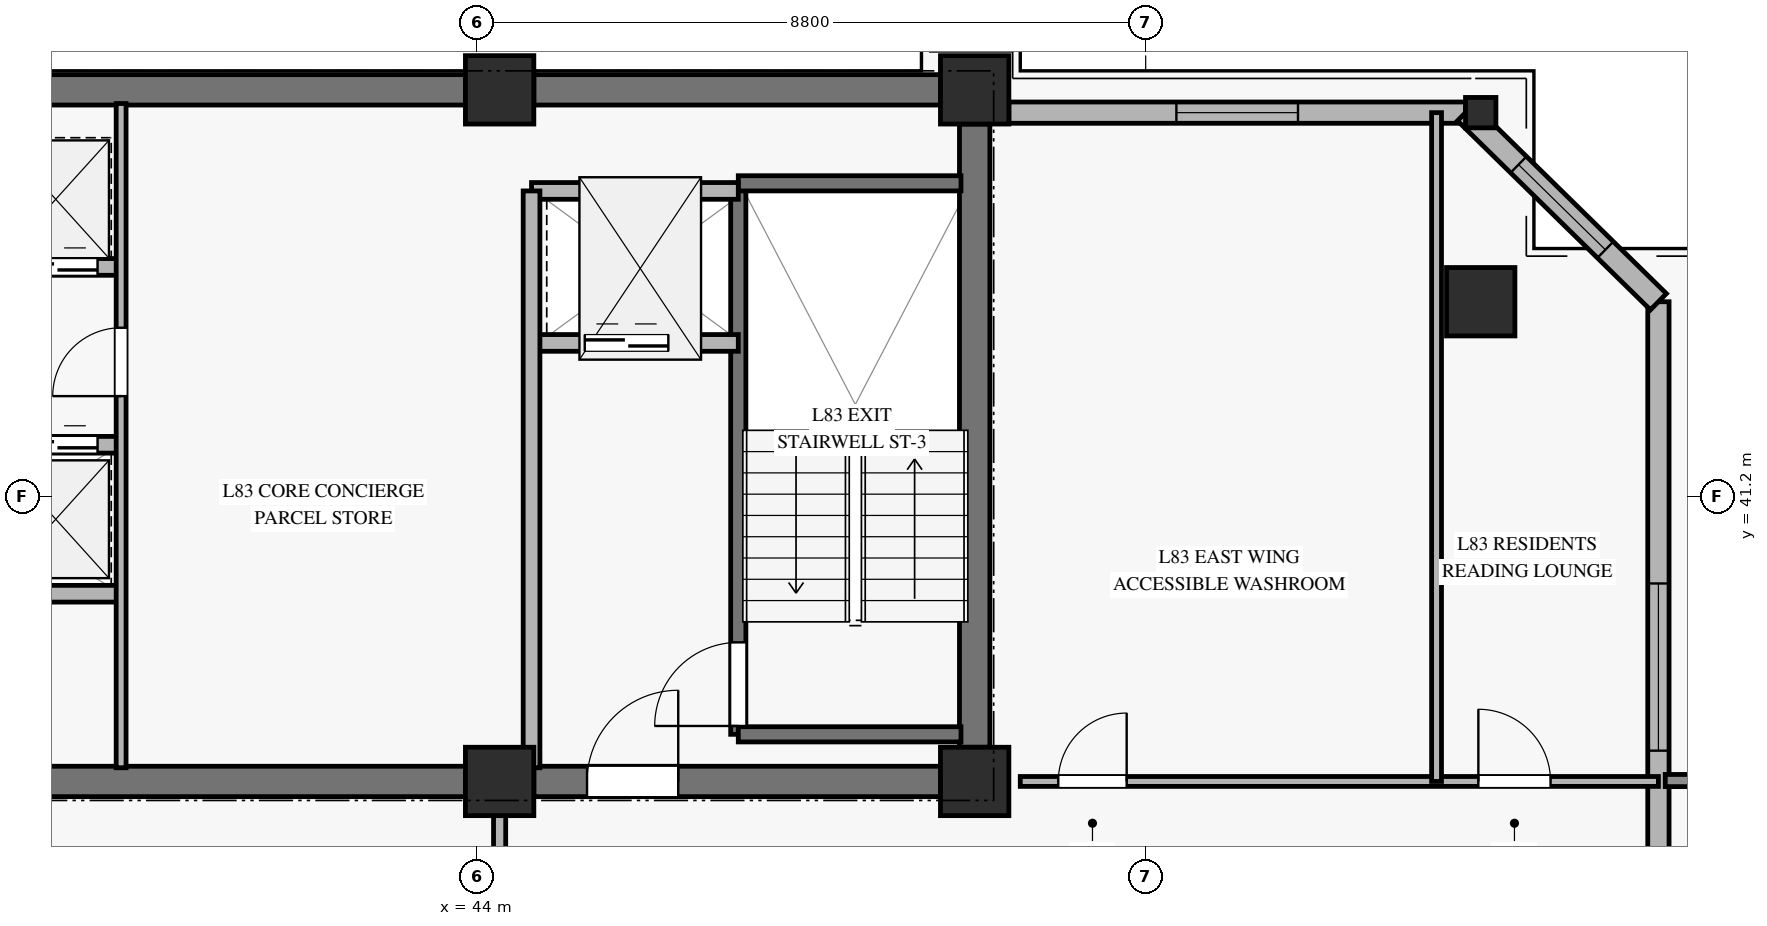
"""IFC4 building model, lengths in metres.
Left out: names, types, materials, properties, quantities, classifications, styles, units other than length and angle.
Written with IfcOpenShell. Run it as: python <this file> out.ifc"""

import sys

from ifc_helpers import new_model, si_unit, direction, frame, frame_2d, origin, origin_2d, place, context, subcontext, project, spatial, rectangle, hollow_rectangle, extrude, source, transform, mapped, element, fill, save


model = new_model("IFC4")
c1 = context("Model", 3, precision=1e-05, world=origin(), true_north=direction((0.0, 1.0)))
c2 = subcontext(c1, "Body", "Model", "MODEL_VIEW")
j1 = project(units=[si_unit("LENGTHUNIT", "METRE"), si_unit("PLANEANGLEUNIT", "RADIAN")], contexts=[c1])
p1 = place(None, origin())
s1 = spatial("IfcSite", under=j1, at=p1, CompositionType="ELEMENT")
p2 = place(p1, origin())
s2 = spatial("IfcBuilding", under=s1, at=p2, CompositionType="ELEMENT")
p3 = place(p2, frame((0.0, 0.0, 321.0)))
s3 = spatial("IfcBuildingStorey", under=s2, at=p3, CompositionType="ELEMENT", Elevation=321.0)
m1 = source(origin(), c2, "Body", "SweptSolid", [
    extrude(rectangle(XDim=0.9, YDim=0.9, at=origin_2d()), origin(), (0.0, 0.0, 1.0), 3.185),
])
for number, where, z_axis, x_axis in (
    (1, (44.3, 37.45, 0.0), (0.0, 0.0, 1.0), (1.0, 0.0, 0.0)),
    (2, (44.3, 46.55, 0.0), (0.0, 0.0, 1.0), (1.0, 0.0, 0.0)),
    (3, (50.55, 37.45, 0.0), (0.0, 0.0, 1.0), (1.0, 0.0, 0.0)),
    (4, (50.55, 46.55, 0.0), (0.0, 0.0, 1.0), (1.0, 0.0, 0.0)),
):
    element("IfcColumn", number, at=place(p3, frame(where, z_axis=z_axis, x_axis=x_axis)), inside=s3, PredefinedType="PILASTER", context=c2, shape_type="MappedRepresentation", body=[
        mapped(m1, transform((0.0, 0.0, 0.0), x_axis=(1.0, 0.0, 0.0), y_axis=(0.0, 1.0, 0.0), z_axis=(0.0, 0.0, 1.0), scale=1.0)),
    ])
p4 = place(p3, frame((36.05, 46.55, 0.0), z_axis=(0.0, 0.0, 1.0), x_axis=(1.0, 0.0, 0.0)))
e5 = element("IfcWall", 5, at=p4, inside=s3, PredefinedType="SHEAR", context=c2, shape_type="SweptSolid", body=[
    extrude(rectangle(XDim=7.8, YDim=0.4, at=frame_2d((3.9, 0.0))), origin(), (0.0, 0.0, 1.0), 3.185),
])
p5 = place(p3, frame((44.75, 46.55, 0.0), z_axis=(0.0, 0.0, 1.0), x_axis=(1.0, 0.0, 0.0)))
e6 = element("IfcWall", 6, at=p5, inside=s3, PredefinedType="SHEAR", context=c2, shape_type="SweptSolid", body=[
    extrude(rectangle(XDim=5.35, YDim=0.4, at=frame_2d((2.675, 0.0))), origin(), (0.0, 0.0, 1.0), 3.185),
])
p6 = place(p3, frame((36.05, 37.45, 0.0), z_axis=(0.0, 0.0, 1.0), x_axis=(1.0, 0.0, 0.0)))
e7 = element("IfcWall", 7, at=p6, inside=s3, PredefinedType="SHEAR", context=c2, shape_type="SweptSolid", body=[
    extrude(rectangle(XDim=7.8, YDim=0.4, at=frame_2d((3.9, 0.0))), origin(), (0.0, 0.0, 1.0), 3.185),
])
p7 = place(p3, frame((44.75, 37.45, 0.0), z_axis=(0.0, 0.0, 1.0), x_axis=(1.0, 0.0, 0.0)))
e8 = element("IfcWall", 8, at=p7, inside=s3, PredefinedType="SHEAR", context=c2, shape_type="SweptSolid", body=[
    extrude(rectangle(XDim=5.35, YDim=0.4, at=frame_2d((2.675, 0.0))), origin(), (0.0, 0.0, 1.0), 3.185),
])
p8 = place(p7, frame((0.7, 0.0, 0.0)))
e9 = element("IfcOpeningElement", 9, at=p8, cuts=e8, PredefinedType="OPENING", context=c2, shape_type="SweptSolid", body=[
    extrude(rectangle(XDim=1.2, YDim=2.15, at=frame_2d((0.6, 1.075))), frame((0.0, 0.21, 0.0), z_axis=(0.0, -1.0, 0.0), x_axis=(1.0, 0.0, 0.0)), (0.0, 0.0, 1.0), 0.42),
])
p9 = place(p3, frame((50.55, 37.9, 0.0), z_axis=(0.0, 0.0, 1.0), x_axis=(0.0, 1.0, 0.0)))
e10 = element("IfcWall", 10, at=p9, inside=s3, PredefinedType="SHEAR", context=c2, shape_type="SweptSolid", body=[
    extrude(rectangle(XDim=8.2, YDim=0.4, at=frame_2d((4.1, 0.0))), origin(), (0.0, 0.0, 1.0), 3.185),
])
m2 = source(origin(), c2, "Body", "SweptSolid", [
    extrude(hollow_rectangle(XDim=0.9, YDim=0.9, WallThickness=0.04, at=origin_2d()), origin(), (0.0, 0.0, 1.0), 3.207),
])
p10 = place(p3, frame((57.208, 43.762, 0.0), z_axis=(-0.115039919341, 0.014389506787, 0.993256643095), x_axis=(-0.12411555831, -0.992267770405, 0.0)))
e11 = element("IfcColumn", 11, at=p10, inside=s3, PredefinedType="COLUMN", context=c2, shape_type="MappedRepresentation", body=[
    mapped(m2, transform((0.0, 0.0, 0.0), x_axis=(1.0, 0.0, 0.0), y_axis=(0.0, 1.0, 0.0), z_axis=(0.0, 0.0, 1.0), scale=1.0)),
])
m3 = source(origin(), c2, "Body", "SweptSolid", [
    extrude(hollow_rectangle(XDim=0.4, YDim=0.4, WallThickness=0.02, at=origin_2d()), origin(), (0.0, 0.0, 1.0), 3.206),
])
p11 = place(p3, frame((57.208, 46.25, 0.0), z_axis=(-0.115051831153, 0.0, 0.993359489887), x_axis=(0.0, -1.0, 0.0)))
e12 = element("IfcColumn", 12, at=p11, inside=s3, PredefinedType="COLUMN", context=c2, shape_type="MappedRepresentation", body=[
    mapped(m3, transform((0.0, 0.0, 0.0), x_axis=(1.0, 0.0, 0.0), y_axis=(0.0, 1.0, 0.0), z_axis=(0.0, 0.0, 1.0), scale=1.0)),
])
p12 = place(p3, frame((59.546, 33.602, 0.0), z_axis=(0.0, 0.0, 1.0), x_axis=(0.0, 1.0, 0.0)))
e13 = element("IfcWall", 13, at=p12, inside=s3, PredefinedType="SOLIDWALL", context=c2, shape_type="SweptSolid", body=[
    extrude(rectangle(XDim=10.16, YDim=0.28, at=frame_2d((5.08, 0.0))), origin(), (0.0, 0.0, 1.0), 2.815),
])
p13 = place(p12, frame((4.253, 0.0, 0.45)))
e14 = element("IfcOpeningElement", 14, at=p13, cuts=e13, PredefinedType="OPENING", context=c2, shape_type="SweptSolid", body=[
    extrude(rectangle(XDim=2.2, YDim=2.1, at=frame_2d((1.1, 1.05))), frame((0.0, 0.15, 0.0), z_axis=(0.0, -1.0, 0.0), x_axis=(1.0, 0.0, 0.0)), (0.0, 0.0, 1.0), 0.3),
])
p14 = place(p3, frame((51.0, 46.25, 0.0), z_axis=(0.0, 0.0, 1.0), x_axis=(1.0, 0.0, 0.0)))
e15 = element("IfcWall", 15, at=p14, inside=s3, PredefinedType="SOLIDWALL", context=c2, shape_type="SweptSolid", body=[
    extrude(rectangle(XDim=6.008, YDim=0.28, at=frame_2d((3.004, 0.0))), origin(), (0.0, 0.0, 1.0), 2.815),
])
p15 = place(p14, frame((2.204, 0.0, 0.45)))
e16 = element("IfcOpeningElement", 16, at=p15, cuts=e15, PredefinedType="OPENING", context=c2, shape_type="SweptSolid", body=[
    extrude(rectangle(XDim=1.6, YDim=2.0, at=frame_2d((0.8, 1.0))), frame((0.0, 0.15, 0.0), z_axis=(0.0, -1.0, 0.0), x_axis=(1.0, 0.0, 0.0)), (0.0, 0.0, 1.0), 0.3),
])
p16 = place(p3, frame((59.546, 43.762, 0.0), z_axis=(0.0, 0.0, 1.0), x_axis=(-0.714078899205, 0.700065229611, 0.0)))
e17 = element("IfcWall", 17, at=p16, inside=s3, PredefinedType="SOLIDWALL", context=c2, shape_type="SweptSolid", body=[
    extrude(rectangle(XDim=3.554, YDim=0.3, at=frame_2d((1.777, 0.0))), origin(), (0.0, 0.0, 1.0), 2.815),
])
p17 = place(p16, frame((0.977, 0.0, 0.45)))
e18 = element("IfcOpeningElement", 18, at=p17, cuts=e17, PredefinedType="OPENING", context=c2, shape_type="SweptSolid", body=[
    extrude(rectangle(XDim=1.6, YDim=2.0, at=frame_2d((0.8, 1.0))), frame((0.0, 0.16, 0.0), z_axis=(0.0, -1.0, 0.0), x_axis=(1.0, 0.0, 0.0)), (0.0, 0.0, 1.0), 0.32),
])
p18 = place(p3, frame((47.44, 38.07, 0.0), z_axis=(0.0, 0.0, 1.0), x_axis=(0.0, 1.0, 0.0)))
e19 = element("IfcWall", 19, at=p18, inside=s3, PredefinedType="SOLIDWALL", context=c2, shape_type="SweptSolid", body=[
    extrude(rectangle(XDim=7.25, YDim=0.2, at=frame_2d((3.625, 0.0))), origin(), (0.0, 0.0, 1.0), 3.4),
])
p19 = place(p18, frame((0.11, 0.0, 0.0)))
e20 = element("IfcOpeningElement", 20, at=p19, cuts=e19, PredefinedType="OPENING", context=c2, shape_type="SweptSolid", body=[
    extrude(rectangle(XDim=1.1, YDim=2.15, at=frame_2d((0.55, 1.075))), frame((0.0, 0.11, 0.0), z_axis=(0.0, -1.0, 0.0), x_axis=(1.0, 0.0, 0.0)), (0.0, 0.0, 1.0), 0.22),
])
for number, where, z_axis, x_axis in (
    (21, (47.44, 45.32, 0.0), (0.0, 0.0, 1.0), (1.0, 0.0, 0.0)),
    (22, (47.44, 38.07, 0.0), (0.0, 0.0, 1.0), (1.0, 0.0, 0.0)),
):
    element("IfcWall", number, at=place(p3, frame(where, z_axis=z_axis, x_axis=x_axis)), inside=s3, PredefinedType="SOLIDWALL", context=c2, shape_type="SweptSolid", body=[
        extrude(rectangle(XDim=2.93, YDim=0.2, at=frame_2d((1.465, 0.0))), origin(), (0.0, 0.0, 1.0), 3.4),
    ])
p20 = place(p3, frame((44.72, 43.22, 0.0), z_axis=(0.0, 0.0, 1.0), x_axis=(1.0, 0.0, 0.0)))
e23 = element("IfcWall", 23, at=p20, inside=s3, PredefinedType="SOLIDWALL", context=c2, shape_type="SweptSolid", body=[
    extrude(rectangle(XDim=2.72, YDim=0.22, at=frame_2d((1.36, 0.0))), origin(), (0.0, 0.0, 1.0), 3.185),
])
p21 = place(p20, frame((0.7, 0.0, 0.0)))
e24 = element("IfcOpeningElement", 24, at=p21, cuts=e23, PredefinedType="OPENING", context=c2, shape_type="SweptSolid", body=[
    extrude(rectangle(XDim=1.1, YDim=2.2, at=frame_2d((0.55, 1.1))), frame((0.0, 0.12, 0.0), z_axis=(0.0, -1.0, 0.0), x_axis=(1.0, 0.0, 0.0)), (0.0, 0.0, 1.0), 0.24),
])
p22 = place(p3, frame((44.72, 45.22, 0.0), z_axis=(0.0, 0.0, 1.0), x_axis=(1.0, 0.0, 0.0)))
e25 = element("IfcWall", 25, at=p22, inside=s3, PredefinedType="SOLIDWALL", context=c2, shape_type="SweptSolid", body=[
    extrude(rectangle(XDim=2.72, YDim=0.22, at=frame_2d((1.36, 0.0))), origin(), (0.0, 0.0, 1.0), 3.185),
])
p23 = place(p3, frame((44.72, 37.63, 0.0), z_axis=(0.0, 0.0, 1.0), x_axis=(0.0, 1.0, 0.0)))
e26 = element("IfcWall", 26, at=p23, inside=s3, PredefinedType="SOLIDWALL", context=c2, shape_type="SweptSolid", body=[
    extrude(rectangle(XDim=7.59, YDim=0.22, at=frame_2d((3.795, 0.0))), origin(), (0.0, 0.0, 1.0), 3.185),
])
p24 = place(p3, frame((36.12, 44.22, 0.0), z_axis=(0.0, 0.0, 1.0), x_axis=(1.0, 0.0, 0.0)))
e27 = element("IfcWall", 27, at=p24, inside=s3, PredefinedType="SOLIDWALL", context=c2, shape_type="SweptSolid", body=[
    extrude(rectangle(XDim=3.2, YDim=0.22, at=frame_2d((1.6, 0.0))), origin(), (0.0, 0.0, 1.0), 3.185),
])
p25 = place(p24, frame((0.3, 0.0, 0.0)))
e28 = element("IfcOpeningElement", 28, at=p25, cuts=e27, PredefinedType="OPENING", context=c2, shape_type="SweptSolid", body=[
    extrude(rectangle(XDim=1.1, YDim=2.2, at=frame_2d((0.55, 1.1))), frame((0.0, 0.12, 0.0), z_axis=(0.0, -1.0, 0.0), x_axis=(1.0, 0.0, 0.0)), (0.0, 0.0, 1.0), 0.24),
])
p26 = place(p24, frame((1.79, 0.0, 0.0)))
e29 = element("IfcOpeningElement", 29, at=p26, cuts=e27, PredefinedType="OPENING", context=c2, shape_type="SweptSolid", body=[
    extrude(rectangle(XDim=1.1, YDim=2.2, at=frame_2d((0.55, 1.1))), frame((0.0, 0.12, 0.0), z_axis=(0.0, -1.0, 0.0), x_axis=(1.0, 0.0, 0.0)), (0.0, 0.0, 1.0), 0.24),
])
p27 = place(p3, frame((36.12, 41.88, 0.0), z_axis=(0.0, 0.0, 1.0), x_axis=(1.0, 0.0, 0.0)))
e30 = element("IfcWall", 30, at=p27, inside=s3, PredefinedType="SOLIDWALL", context=c2, shape_type="SweptSolid", body=[
    extrude(rectangle(XDim=3.2, YDim=0.22, at=frame_2d((1.6, 0.0))), origin(), (0.0, 0.0, 1.0), 3.185),
])
p28 = place(p27, frame((0.3, 0.0, 0.0)))
e31 = element("IfcOpeningElement", 31, at=p28, cuts=e30, PredefinedType="OPENING", context=c2, shape_type="SweptSolid", body=[
    extrude(rectangle(XDim=1.1, YDim=2.2, at=frame_2d((0.55, 1.1))), frame((0.0, 0.12, 0.0), z_axis=(0.0, -1.0, 0.0), x_axis=(1.0, 0.0, 0.0)), (0.0, 0.0, 1.0), 0.24),
])
p29 = place(p27, frame((1.79, 0.0, 0.0)))
e32 = element("IfcOpeningElement", 32, at=p29, cuts=e30, PredefinedType="OPENING", context=c2, shape_type="SweptSolid", body=[
    extrude(rectangle(XDim=1.1, YDim=2.2, at=frame_2d((0.55, 1.1))), frame((0.0, 0.12, 0.0), z_axis=(0.0, -1.0, 0.0), x_axis=(1.0, 0.0, 0.0)), (0.0, 0.0, 1.0), 0.24),
])
p30 = place(p3, frame((36.12, 39.92, 0.0), z_axis=(0.0, 0.0, 1.0), x_axis=(1.0, 0.0, 0.0)))
e33 = element("IfcWall", 33, at=p30, inside=s3, PredefinedType="SOLIDWALL", context=c2, shape_type="SweptSolid", body=[
    extrude(rectangle(XDim=3.2, YDim=0.22, at=frame_2d((1.6, 0.0))), origin(), (0.0, 0.0, 1.0), 3.185),
])
p31 = place(p3, frame((39.32, 37.63, 0.0), z_axis=(0.0, 0.0, 1.0), x_axis=(0.0, 1.0, 0.0)))
e34 = element("IfcWall", 34, at=p31, inside=s3, PredefinedType="PARTITIONING", context=c2, shape_type="SweptSolid", body=[
    extrude(rectangle(XDim=8.74, YDim=0.13, at=frame_2d((4.37, 0.0))), origin(), (0.0, 0.0, 1.0), 3.185),
])
p32 = place(p31, frame((4.89, 0.0, 0.0)))
e35 = element("IfcOpeningElement", 35, at=p32, cuts=e34, PredefinedType="OPENING", context=c2, shape_type="SweptSolid", body=[
    extrude(rectangle(XDim=0.9, YDim=2.1, at=frame_2d((0.45, 1.05))), frame((0.0, 0.075, 0.0), z_axis=(0.0, -1.0, 0.0), x_axis=(1.0, 0.0, 0.0)), (0.0, 0.0, 1.0), 0.15),
])
p33 = place(p3, frame((44.3, 20.704, 0.0), z_axis=(0.0, 0.0, 1.0), x_axis=(0.0, 1.0, 0.0)))
e36 = element("IfcWall", 36, at=p33, inside=s3, PredefinedType="PARTITIONING", context=c2, shape_type="SweptSolid", body=[
    extrude(rectangle(XDim=16.746, YDim=0.16, at=frame_2d((8.373, 0.0))), origin(), (0.0, 0.0, 1.0), 2.47),
])
p34 = place(p33, frame((13.766, 0.0, 0.0)))
e37 = element("IfcOpeningElement", 37, at=p34, cuts=e36, PredefinedType="OPENING", context=c2, shape_type="SweptSolid", body=[
    extrude(rectangle(XDim=1.05, YDim=2.15, at=frame_2d((0.525, 1.075))), frame((0.0, 0.09, 0.0), z_axis=(0.0, -1.0, 0.0), x_axis=(1.0, 0.0, 0.0)), (0.0, 0.0, 1.0), 0.18),
])
p35 = place(p3, frame((51.15, 37.45, 0.0), z_axis=(0.0, 0.0, 1.0), x_axis=(1.0, 0.0, 0.0)))
e38 = element("IfcWall", 38, at=p35, inside=s3, PredefinedType="PARTITIONING", context=c2, shape_type="SweptSolid", body=[
    extrude(rectangle(XDim=8.396, YDim=0.13, at=frame_2d((4.198, 0.0))), origin(), (0.0, 0.0, 1.0), 2.82),
])
p36 = place(p35, frame((0.5, 0.0, 0.0)))
e39 = element("IfcOpeningElement", 39, at=p36, cuts=e38, PredefinedType="OPENING", context=c2, shape_type="SweptSolid", body=[
    extrude(rectangle(XDim=0.9, YDim=2.1, at=frame_2d((0.45, 1.05))), frame((0.0, 0.075, 0.0), z_axis=(0.0, -1.0, 0.0), x_axis=(1.0, 0.0, 0.0)), (0.0, 0.0, 1.0), 0.15),
])
p37 = place(p35, frame((6.027, 0.0, 0.0)))
e40 = element("IfcOpeningElement", 40, at=p37, cuts=e38, PredefinedType="OPENING", context=c2, shape_type="SweptSolid", body=[
    extrude(rectangle(XDim=0.95, YDim=2.1, at=frame_2d((0.475, 1.05))), frame((0.0, 0.075, 0.0), z_axis=(0.0, -1.0, 0.0), x_axis=(1.0, 0.0, 0.0)), (0.0, 0.0, 1.0), 0.15),
])
p38 = place(p3, frame((56.627, 37.45, 0.0), z_axis=(0.0, 0.0, 1.0), x_axis=(0.0, 1.0, 0.0)))
e41 = element("IfcWall", 41, at=p38, inside=s3, PredefinedType="PARTITIONING", context=c2, shape_type="SweptSolid", body=[
    extrude(rectangle(XDim=8.8, YDim=0.13, at=frame_2d((4.4, 0.0))), origin(), (0.0, 0.0, 1.0), 3.185),
])
m4 = source(origin(), c2, "Body", "SweptSolid", [
    extrude(rectangle(XDim=2.2, YDim=2.1, at=frame_2d((1.1, 1.05))), frame((0.0, 0.03, 0.0), z_axis=(0.0, -1.0, 0.0), x_axis=(1.0, 0.0, 0.0)), (0.0, 0.0, 1.0), 0.06),
])
p39 = place(p13, origin())
e42 = element("IfcWindow", 42, at=p39, inside=s3, PartitioningType="SINGLE_PANEL", PredefinedType="WINDOW", context=c2, shape_type="MappedRepresentation", body=[
    mapped(m4, transform((0.0, 0.0, 0.0), x_axis=(1.0, 0.0, 0.0), y_axis=(0.0, 1.0, 0.0), z_axis=(0.0, 0.0, 1.0), scale=1.0)),
])
fill(e14, e42)
m5 = source(origin(), c2, "Body", "SweptSolid", [
    extrude(rectangle(XDim=1.6, YDim=2.0, at=frame_2d((0.8, 1.0))), frame((0.0, 0.03, 0.0), z_axis=(0.0, -1.0, 0.0), x_axis=(1.0, 0.0, 0.0)), (0.0, 0.0, 1.0), 0.06),
])
p40 = place(p15, origin())
e43 = element("IfcWindow", 43, at=p40, inside=s3, PartitioningType="SINGLE_PANEL", PredefinedType="WINDOW", context=c2, shape_type="MappedRepresentation", body=[
    mapped(m5, transform((0.0, 0.0, 0.0), x_axis=(1.0, 0.0, 0.0), y_axis=(0.0, 1.0, 0.0), z_axis=(0.0, 0.0, 1.0), scale=1.0)),
])
fill(e16, e43)
p41 = place(p17, origin())
e44 = element("IfcWindow", 44, at=p41, inside=s3, PartitioningType="SINGLE_PANEL", PredefinedType="WINDOW", context=c2, shape_type="MappedRepresentation", body=[
    mapped(m5, transform((0.0, 0.0, 0.0), x_axis=(1.0, 0.0, 0.0), y_axis=(0.0, 1.0, 0.0), z_axis=(0.0, 0.0, 1.0), scale=1.0)),
])
fill(e18, e44)
m6 = source(origin(), c2, "Body", "SweptSolid", [
    extrude(rectangle(XDim=1.1, YDim=2.15, at=frame_2d((0.55, 1.075))), frame((0.0, 0.025, 0.0), z_axis=(0.0, -1.0, 0.0), x_axis=(1.0, 0.0, 0.0)), (0.0, 0.0, 1.0), 0.05),
])
p42 = place(p19, origin())
e45 = element("IfcDoor", 45, at=p42, inside=s3, OperationType="SINGLE_SWING_LEFT", PredefinedType="DOOR", context=c2, shape_type="MappedRepresentation", body=[
    mapped(m6, transform((0.0, 0.0, 0.0), x_axis=(1.0, 0.0, 0.0), y_axis=(0.0, 1.0, 0.0), z_axis=(0.0, 0.0, 1.0), scale=1.0)),
])
fill(e20, e45)
m7 = source(origin(), c2, "Body", "SweptSolid", [
    extrude(rectangle(XDim=1.1, YDim=2.2, at=frame_2d((0.55, 1.1))), frame((0.0, 0.025, 0.0), z_axis=(0.0, -1.0, 0.0), x_axis=(1.0, 0.0, 0.0)), (0.0, 0.0, 1.0), 0.05),
])
p43 = place(p21, origin())
e46 = element("IfcDoor", 46, at=p43, inside=s3, OperationType="SLIDING_TO_LEFT", PredefinedType="DOOR", context=c2, shape_type="MappedRepresentation", body=[
    mapped(m7, transform((0.0, 0.0, 0.0), x_axis=(1.0, 0.0, 0.0), y_axis=(0.0, 1.0, 0.0), z_axis=(0.0, 0.0, 1.0), scale=1.0)),
])
fill(e24, e46)
m8 = source(origin(), c2, "Body", "SweptSolid", [
    extrude(rectangle(XDim=1.2, YDim=2.15, at=frame_2d((0.6, 1.075))), frame((0.0, 0.025, 0.0), z_axis=(0.0, -1.0, 0.0), x_axis=(1.0, 0.0, 0.0)), (0.0, 0.0, 1.0), 0.05),
])
p44 = place(p8, origin())
e47 = element("IfcDoor", 47, at=p44, inside=s3, OperationType="SINGLE_SWING_RIGHT", PredefinedType="DOOR", context=c2, shape_type="MappedRepresentation", body=[
    mapped(m8, transform((0.0, 0.0, 0.0), x_axis=(1.0, 0.0, 0.0), y_axis=(0.0, 1.0, 0.0), z_axis=(0.0, 0.0, 1.0), scale=1.0)),
])
fill(e9, e47)
p45 = place(p26, origin())
e48 = element("IfcDoor", 48, at=p45, inside=s3, OperationType="SLIDING_TO_LEFT", PredefinedType="DOOR", context=c2, shape_type="MappedRepresentation", body=[
    mapped(m7, transform((0.0, 0.0, 0.0), x_axis=(1.0, 0.0, 0.0), y_axis=(0.0, 1.0, 0.0), z_axis=(0.0, 0.0, 1.0), scale=1.0)),
])
fill(e29, e48)
p46 = place(p29, origin())
e49 = element("IfcDoor", 49, at=p46, inside=s3, OperationType="SLIDING_TO_LEFT", PredefinedType="DOOR", context=c2, shape_type="MappedRepresentation", body=[
    mapped(m7, transform((0.0, 0.0, 0.0), x_axis=(1.0, 0.0, 0.0), y_axis=(0.0, 1.0, 0.0), z_axis=(0.0, 0.0, 1.0), scale=1.0)),
])
fill(e32, e49)
m9 = source(origin(), c2, "Body", "SweptSolid", [
    extrude(rectangle(XDim=0.9, YDim=2.1, at=frame_2d((0.45, 1.05))), frame((0.0, 0.025, 0.0), z_axis=(0.0, -1.0, 0.0), x_axis=(1.0, 0.0, 0.0)), (0.0, 0.0, 1.0), 0.05),
])
p47 = place(p32, origin())
e50 = element("IfcDoor", 50, at=p47, inside=s3, OperationType="SINGLE_SWING_LEFT", PredefinedType="DOOR", context=c2, shape_type="MappedRepresentation", body=[
    mapped(m9, transform((0.0, 0.0, 0.0), x_axis=(1.0, 0.0, 0.0), y_axis=(0.0, 1.0, 0.0), z_axis=(0.0, 0.0, 1.0), scale=1.0)),
])
fill(e35, e50)
p48 = place(p36, origin())
e51 = element("IfcDoor", 51, at=p48, inside=s3, OperationType="SINGLE_SWING_RIGHT", PredefinedType="DOOR", context=c2, shape_type="MappedRepresentation", body=[
    mapped(m9, transform((0.0, 0.0, 0.0), x_axis=(1.0, 0.0, 0.0), y_axis=(0.0, 1.0, 0.0), z_axis=(0.0, 0.0, 1.0), scale=1.0)),
])
fill(e39, e51)
m10 = source(origin(), c2, "Body", "SweptSolid", [
    extrude(rectangle(XDim=0.95, YDim=2.1, at=frame_2d((0.475, 1.05))), frame((0.0, 0.025, 0.0), z_axis=(0.0, -1.0, 0.0), x_axis=(1.0, 0.0, 0.0)), (0.0, 0.0, 1.0), 0.05),
])
p49 = place(p37, origin())
e52 = element("IfcDoor", 52, at=p49, inside=s3, OperationType="SINGLE_SWING_LEFT", PredefinedType="DOOR", context=c2, shape_type="MappedRepresentation", body=[
    mapped(m10, transform((0.0, 0.0, 0.0), x_axis=(1.0, 0.0, 0.0), y_axis=(0.0, 1.0, 0.0), z_axis=(0.0, 0.0, 1.0), scale=1.0)),
])
fill(e40, e52)
save(model, sys.argv[1])
